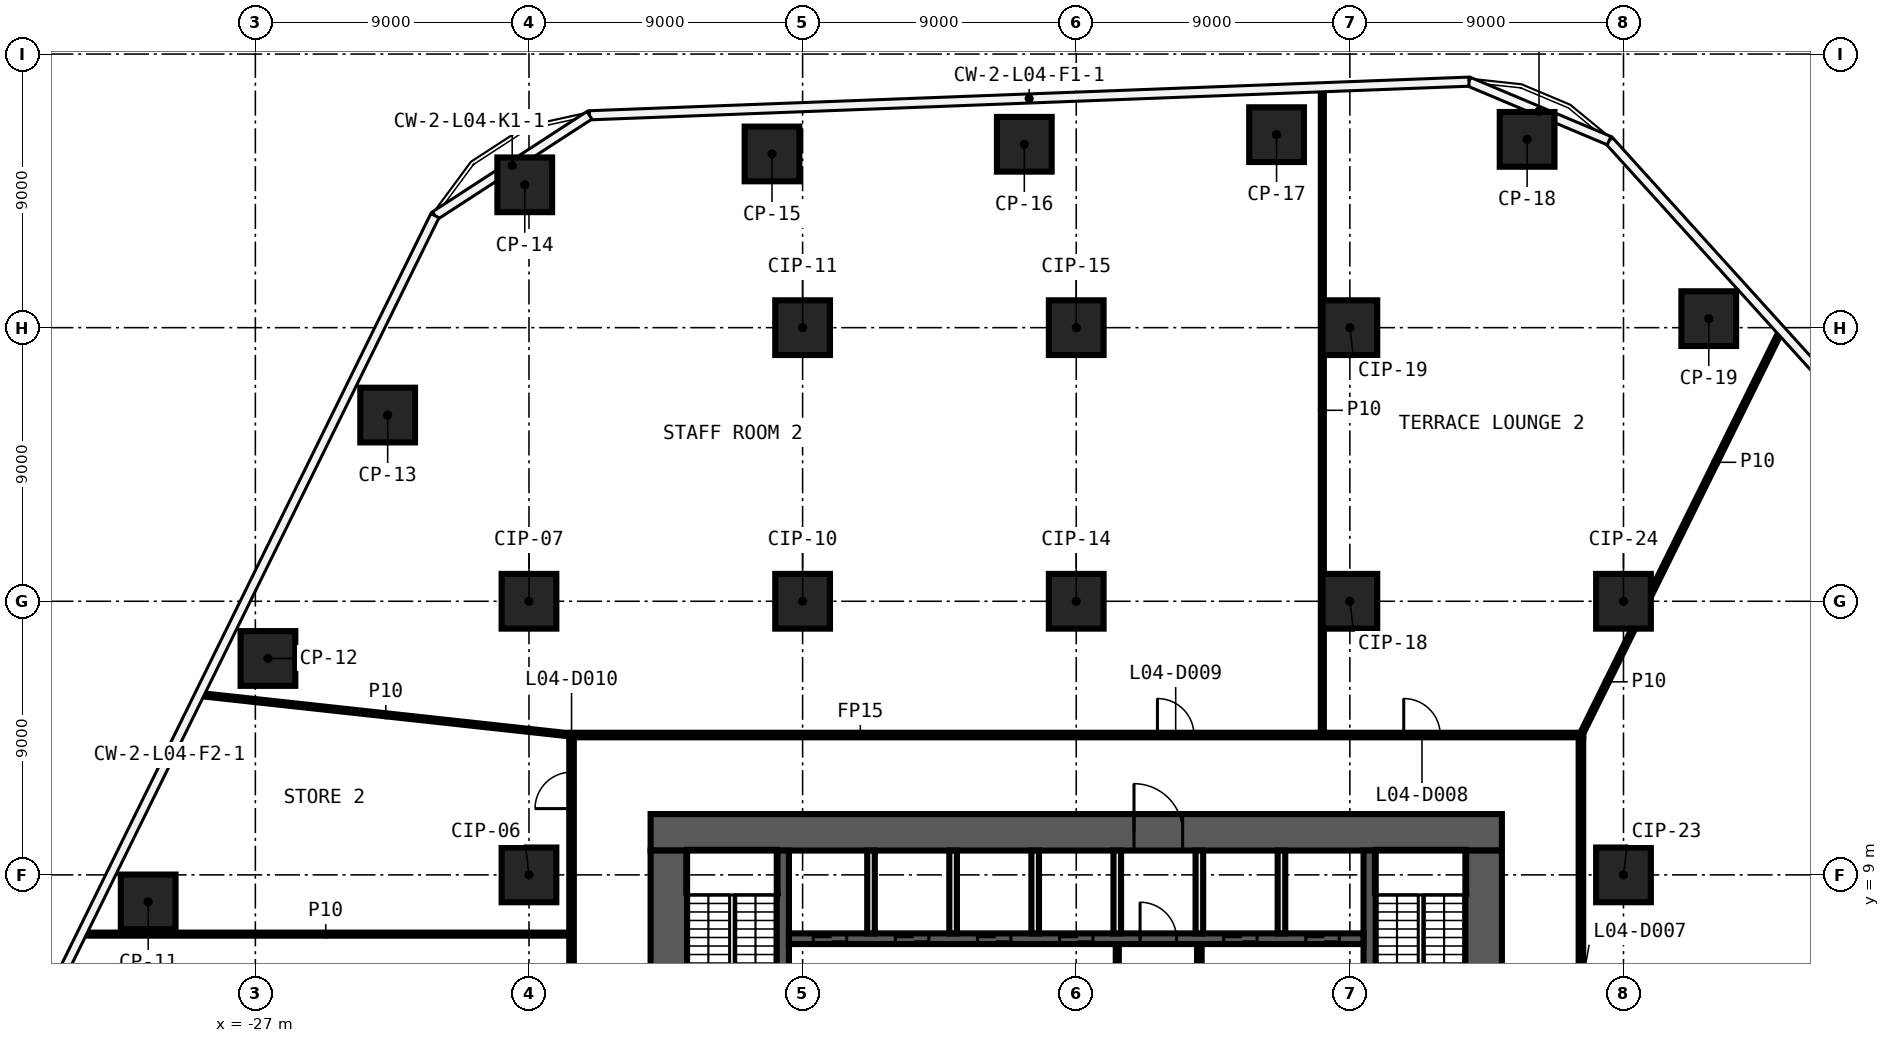
"""IFC4 building model, lengths in metres.
Left out: names, types, materials, properties, quantities, classifications, styles, units other than length and angle.
Written with IfcOpenShell. Run it as: python <this file> out.ifc"""

import sys

from ifc_helpers import new_model, si_unit, direction, frame, frame_2d, origin, origin_2d, place, context, subcontext, project, spatial, rectangle, extrude, element, fill, save


model = new_model("IFC4")
c1 = context("Model", 3, precision=1e-05, world=origin(), true_north=direction((0.0, 1.0)))
c2 = subcontext(c1, "Body", "Model", "MODEL_VIEW")
j1 = project(units=[si_unit("LENGTHUNIT", "METRE"), si_unit("PLANEANGLEUNIT", "RADIAN")], contexts=[c1])
p1 = place(None, origin())
s1 = spatial("IfcSite", under=j1, at=p1, CompositionType="ELEMENT")
p2 = place(p1, origin())
s2 = spatial("IfcBuilding", under=s1, at=p2, CompositionType="ELEMENT")
p3 = place(p2, frame((0.0, 0.0, 33.0)))
s3 = spatial("IfcBuildingStorey", under=s2, at=p3, CompositionType="ELEMENT", Elevation=33.0)
for number, where, z_axis, x_axis in (
    (1, (-30.525, 8.111, 0.0), (0.0, 0.0, 1.0), (1.0, 0.0, 0.0)),
    (2, (-26.586, 16.118, 0.0), (0.0, 0.0, 1.0), (1.0, 0.0, 0.0)),
    (3, (-22.648, 24.125, 0.0), (0.0, 0.0, 1.0), (1.0, 0.0, 0.0)),
    (4, (-18.139, 31.699, 0.0), (0.0, 0.0, 1.0), (1.0, 0.0, 0.0)),
    (5, (-10.006, 32.714, 0.0), (0.0, 0.0, 1.0), (1.0, 0.0, 0.0)),
    (6, (-1.708, 33.032, 0.0), (0.0, 0.0, 1.0), (1.0, 0.0, 0.0)),
    (7, (6.589, 33.349, 0.0), (0.0, 0.0, 1.0), (1.0, 0.0, 0.0)),
    (8, (14.83, 33.194, 0.0), (0.0, 0.0, 1.0), (1.0, 0.0, 0.0)),
    (9, (20.805, 27.297, 0.0), (0.0, 0.0, 1.0), (1.0, 0.0, 0.0)),
    (10, (-18.0, 9.0, 0.0), (0.0, 0.0, 1.0), (1.0, 0.0, 0.0)),
    (11, (-18.0, 18.0, 0.0), (0.0, 0.0, 1.0), (1.0, 0.0, 0.0)),
    (12, (-9.0, 18.0, 0.0), (0.0, 0.0, 1.0), (1.0, 0.0, 0.0)),
    (13, (-9.0, 27.0, 0.0), (0.0, 0.0, 1.0), (1.0, 0.0, 0.0)),
    (14, (0.0, 18.0, 0.0), (0.0, 0.0, 1.0), (1.0, 0.0, 0.0)),
    (15, (0.0, 27.0, 0.0), (0.0, 0.0, 1.0), (1.0, 0.0, 0.0)),
    (16, (9.0, 18.0, 0.0), (0.0, 0.0, 1.0), (1.0, 0.0, 0.0)),
    (17, (9.0, 27.0, 0.0), (0.0, 0.0, 1.0), (1.0, 0.0, 0.0)),
    (18, (18.0, 9.0, 0.0), (0.0, 0.0, 1.0), (1.0, 0.0, 0.0)),
    (19, (18.0, 18.0, 0.0), (0.0, 0.0, 1.0), (1.0, 0.0, 0.0)),
):
    element("IfcColumn", number, at=place(p3, frame(where, z_axis=z_axis, x_axis=x_axis)), inside=s3, PredefinedType="COLUMN", context=c2, shape_type="SweptSolid", body=[
        extrude(rectangle(XDim=1.8, YDim=1.8, at=origin_2d()), origin(), (0.0, 0.0, 1.0), 4.6),
    ])
p4 = place(p3, frame((-32.695, 7.051, 0.0), z_axis=(0.0, 0.0, 1.0), x_axis=(1.0, 0.0, 0.0)))
e20 = element("IfcWall", 20, at=p4, inside=s3, PredefinedType="PARTITIONING", context=c2, shape_type="SweptSolid", body=[
    extrude(rectangle(XDim=16.02, YDim=0.1, at=frame_2d((8.01, 0.0))), origin(), (0.0, 0.0, 1.0), 4.6),
])
p5 = place(p3, frame((-16.675, 13.6, 0.0), z_axis=(0.0, 0.0, 1.0), x_axis=(1.0, 0.0, 0.0)))
e21 = element("IfcWall", 21, at=p5, inside=s3, PredefinedType="PARTITIONING", context=c2, shape_type="SweptSolid", body=[
    extrude(rectangle(XDim=33.35, YDim=0.15, at=frame_2d((16.675, 0.0))), origin(), (0.0, 0.0, 1.0), 4.6),
])
p6 = place(p5, frame((27.447, 0.0, 0.0)))
e22 = element("IfcOpeningElement", 22, at=p6, cuts=e21, PredefinedType="OPENING", context=c2, shape_type="SweptSolid", body=[
    extrude(rectangle(XDim=1.2, YDim=2.1, at=frame_2d((0.6, 1.05))), frame((0.0, 0.085, 0.0), z_axis=(0.0, -1.0, 0.0), x_axis=(1.0, 0.0, 0.0)), (0.0, 0.0, 1.0), 0.17),
])
p7 = place(p5, frame((19.346, 0.0, 0.0)))
e23 = element("IfcOpeningElement", 23, at=p7, cuts=e21, PredefinedType="OPENING", context=c2, shape_type="SweptSolid", body=[
    extrude(rectangle(XDim=1.2, YDim=2.1, at=frame_2d((0.6, 1.05))), frame((0.0, 0.085, 0.0), z_axis=(0.0, -1.0, 0.0), x_axis=(1.0, 0.0, 0.0)), (0.0, 0.0, 1.0), 0.17),
])
p8 = place(p3, frame((16.6, 13.6, 0.0), z_axis=(0.0, 0.0, 1.0), x_axis=(0.443207247844, 0.896419173969, 0.0)))
e24 = element("IfcWall", 24, at=p8, inside=s3, PredefinedType="PARTITIONING", context=c2, shape_type="SweptSolid", body=[
    extrude(rectangle(XDim=3.905, YDim=0.1, at=frame_2d((1.952, 0.0))), origin(), (0.0, 0.0, 1.0), 4.6),
])
p9 = place(p3, frame((18.9, 18.253, 0.0), z_axis=(0.0, 0.0, 1.0), x_axis=(0.443225904803, 0.89640994936, 0.0)))
e25 = element("IfcWall", 25, at=p9, inside=s3, PredefinedType="PARTITIONING", context=c2, shape_type="SweptSolid", body=[
    extrude(rectangle(XDim=9.635, YDim=0.1, at=frame_2d((4.817, 0.0))), origin(), (0.0, 0.0, 1.0), 4.6),
])
p10 = place(p3, frame((16.6, 13.525, 0.0), z_axis=(0.0, 0.0, 1.0), x_axis=(0.0, -1.0, 0.0)))
e26 = element("IfcWall", 26, at=p10, inside=s3, PredefinedType="PARTITIONING", context=c2, shape_type="SweptSolid", body=[
    extrude(rectangle(XDim=27.05, YDim=0.15, at=frame_2d((13.525, 0.0))), origin(), (0.0, 0.0, 1.0), 4.6),
])
p11 = place(p10, frame((16.006, 0.0, 0.0)))
e27 = element("IfcOpeningElement", 27, at=p11, cuts=e26, PredefinedType="OPENING", context=c2, shape_type="SweptSolid", body=[
    extrude(rectangle(XDim=1.2, YDim=2.1, at=frame_2d((0.6, 1.05))), frame((0.0, 0.085, 0.0), z_axis=(0.0, -1.0, 0.0), x_axis=(1.0, 0.0, 0.0)), (0.0, 0.0, 1.0), 0.17),
])
p12 = place(p10, frame((7.745, 0.0, 0.0)))
e28 = element("IfcOpeningElement", 28, at=p12, cuts=e26, PredefinedType="OPENING", context=c2, shape_type="SweptSolid", body=[
    extrude(rectangle(XDim=1.2, YDim=2.1, at=frame_2d((0.6, 1.05))), frame((0.0, 0.085, 0.0), z_axis=(0.0, -1.0, 0.0), x_axis=(1.0, 0.0, 0.0)), (0.0, 0.0, 1.0), 0.17),
])
p13 = place(p3, frame((8.095, 13.675, 0.0), z_axis=(0.0, 0.0, 1.0), x_axis=(0.0, 1.0, 0.0)))
e29 = element("IfcWall", 29, at=p13, inside=s3, PredefinedType="PARTITIONING", context=c2, shape_type="SweptSolid", body=[
    extrude(rectangle(XDim=21.213, YDim=0.1, at=frame_2d((10.606, 0.0))), origin(), (0.0, 0.0, 1.0), 4.6),
])
p14 = place(p3, frame((-16.6, -13.525, 0.0), z_axis=(0.0, 0.0, 1.0), x_axis=(0.0, 1.0, 0.0)))
e30 = element("IfcWall", 30, at=p14, inside=s3, PredefinedType="PARTITIONING", context=c2, shape_type="SweptSolid", body=[
    extrude(rectangle(XDim=27.05, YDim=0.15, at=frame_2d((13.525, 0.0))), origin(), (0.0, 0.0, 1.0), 4.6),
])
p15 = place(p14, frame((16.028, 0.0, 0.0)))
e31 = element("IfcOpeningElement", 31, at=p15, cuts=e30, PredefinedType="OPENING", context=c2, shape_type="SweptSolid", body=[
    extrude(rectangle(XDim=1.2, YDim=2.1, at=frame_2d((0.6, 1.05))), frame((0.0, 0.085, 0.0), z_axis=(0.0, -1.0, 0.0), x_axis=(1.0, 0.0, 0.0)), (0.0, 0.0, 1.0), 0.17),
])
p16 = place(p14, frame((1.121, 0.0, 0.0)))
e32 = element("IfcOpeningElement", 32, at=p16, cuts=e30, PredefinedType="OPENING", context=c2, shape_type="SweptSolid", body=[
    extrude(rectangle(XDim=1.2, YDim=2.1, at=frame_2d((0.6, 1.05))), frame((0.0, 0.085, 0.0), z_axis=(0.0, -1.0, 0.0), x_axis=(1.0, 0.0, 0.0)), (0.0, 0.0, 1.0), 0.17),
])
p17 = place(p14, frame((24.705, 0.0, 0.0)))
e33 = element("IfcOpeningElement", 33, at=p17, cuts=e30, PredefinedType="OPENING", context=c2, shape_type="SweptSolid", body=[
    extrude(rectangle(XDim=1.2, YDim=2.1, at=frame_2d((0.6, 1.05))), frame((0.0, 0.085, 0.0), z_axis=(0.0, -1.0, 0.0), x_axis=(1.0, 0.0, 0.0)), (0.0, 0.0, 1.0), 0.17),
])
p18 = place(p3, frame((-28.819, 14.931, 0.0), z_axis=(0.0, 0.0, 1.0), x_axis=(0.994112645196, -0.108351505116, 0.0)))
e34 = element("IfcWall", 34, at=p18, inside=s3, PredefinedType="PARTITIONING", context=c2, shape_type="SweptSolid", body=[
    extrude(rectangle(XDim=12.291, YDim=0.1, at=frame_2d((6.146, 0.0))), origin(), (0.0, 0.0, 1.0), 4.6),
])
p19 = place(p3, frame((-14.0, 10.4, 0.0), z_axis=(0.0, 0.0, 1.0), x_axis=(1.0, 0.0, 0.0)))
e35 = element("IfcWall", 35, at=p19, inside=s3, PredefinedType="SHEAR", context=c2, shape_type="SweptSolid", body=[
    extrude(rectangle(XDim=28.0, YDim=1.2, at=frame_2d((14.0, 0.0))), origin(), (0.0, 0.0, 1.0), 4.6),
])
p20 = place(p19, frame((15.9, 0.0, 0.0)))
e36 = element("IfcOpeningElement", 36, at=p20, cuts=e35, PredefinedType="OPENING", context=c2, shape_type="SweptSolid", body=[
    extrude(rectangle(XDim=1.6, YDim=2.1, at=frame_2d((0.8, 1.05))), frame((0.0, 0.61, 0.0), z_axis=(0.0, -1.0, 0.0), x_axis=(1.0, 0.0, 0.0)), (0.0, 0.0, 1.0), 1.22),
])
for number, where, z_axis, x_axis in (
    (37, (13.4, 9.8, 0.0), (0.0, 0.0, 1.0), (0.0, -1.0, 0.0)),
    (38, (-13.4, -9.8, 0.0), (0.0, 0.0, 1.0), (0.0, 1.0, 0.0)),
):
    element("IfcWall", number, at=place(p3, frame(where, z_axis=z_axis, x_axis=x_axis)), inside=s3, PredefinedType="SHEAR", context=c2, shape_type="SweptSolid", body=[
        extrude(rectangle(XDim=19.6, YDim=1.2, at=frame_2d((9.8, 0.0))), origin(), (0.0, 0.0, 1.0), 4.6),
    ])
p21 = place(p3, frame((9.65, 9.8, 0.0), z_axis=(0.0, 0.0, 1.0), x_axis=(0.0, -1.0, 0.0)))
e39 = element("IfcWall", 39, at=p21, inside=s3, PredefinedType="SHEAR", context=c2, shape_type="SweptSolid", body=[
    extrude(rectangle(XDim=7.5, YDim=0.4, at=frame_2d((3.75, 0.0))), origin(), (0.0, 0.0, 1.0), 4.6),
])
p22 = place(p21, frame((5.1, 0.0, 0.0)))
e40 = element("IfcOpeningElement", 40, at=p22, cuts=e39, PredefinedType="OPENING", context=c2, shape_type="SweptSolid", body=[
    extrude(rectangle(XDim=1.2, YDim=2.1, at=frame_2d((0.6, 1.05))), frame((0.0, 0.21, 0.0), z_axis=(0.0, -1.0, 0.0), x_axis=(1.0, 0.0, 0.0)), (0.0, 0.0, 1.0), 0.42),
])
p23 = place(p3, frame((-9.65, 2.3, 0.0), z_axis=(0.0, 0.0, 1.0), x_axis=(0.0, 1.0, 0.0)))
e41 = element("IfcWall", 41, at=p23, inside=s3, PredefinedType="SHEAR", context=c2, shape_type="SweptSolid", body=[
    extrude(rectangle(XDim=7.5, YDim=0.4, at=frame_2d((3.75, 0.0))), origin(), (0.0, 0.0, 1.0), 4.6),
])
p24 = place(p23, frame((1.2, 0.0, 0.0)))
e42 = element("IfcOpeningElement", 42, at=p24, cuts=e41, PredefinedType="OPENING", context=c2, shape_type="SweptSolid", body=[
    extrude(rectangle(XDim=1.2, YDim=2.1, at=frame_2d((0.6, 1.05))), frame((0.0, 0.21, 0.0), z_axis=(0.0, -1.0, 0.0), x_axis=(1.0, 0.0, 0.0)), (0.0, 0.0, 1.0), 0.42),
])
p25 = place(p3, frame((-9.45, 6.9, 0.0), z_axis=(0.0, 0.0, 1.0), x_axis=(1.0, 0.0, 0.0)))
e43 = element("IfcWall", 43, at=p25, inside=s3, PredefinedType="SHEAR", context=c2, shape_type="SweptSolid", body=[
    extrude(rectangle(XDim=18.9, YDim=0.35, at=frame_2d((9.45, 0.0))), origin(), (0.0, 0.0, 1.0), 4.6),
])
p26 = place(p25, frame((0.8, 0.0, 0.0)))
e44 = element("IfcOpeningElement", 44, at=p26, cuts=e43, PredefinedType="OPENING", context=c2, shape_type="SweptSolid", body=[
    extrude(rectangle(XDim=1.1, YDim=2.1, at=frame_2d((0.55, 1.05))), frame((0.0, 0.185, 0.0), z_axis=(0.0, -1.0, 0.0), x_axis=(1.0, 0.0, 0.0)), (0.0, 0.0, 1.0), 0.37),
])
p27 = place(p25, frame((3.5, 0.0, 0.0)))
e45 = element("IfcOpeningElement", 45, at=p27, cuts=e43, PredefinedType="OPENING", context=c2, shape_type="SweptSolid", body=[
    extrude(rectangle(XDim=1.1, YDim=2.1, at=frame_2d((0.55, 1.05))), frame((0.0, 0.185, 0.0), z_axis=(0.0, -1.0, 0.0), x_axis=(1.0, 0.0, 0.0)), (0.0, 0.0, 1.0), 0.37),
])
p28 = place(p25, frame((6.2, 0.0, 0.0)))
e46 = element("IfcOpeningElement", 46, at=p28, cuts=e43, PredefinedType="OPENING", context=c2, shape_type="SweptSolid", body=[
    extrude(rectangle(XDim=1.1, YDim=2.1, at=frame_2d((0.55, 1.05))), frame((0.0, 0.185, 0.0), z_axis=(0.0, -1.0, 0.0), x_axis=(1.0, 0.0, 0.0)), (0.0, 0.0, 1.0), 0.37),
])
p29 = place(p25, frame((8.9, 0.0, 0.0)))
e47 = element("IfcOpeningElement", 47, at=p29, cuts=e43, PredefinedType="OPENING", context=c2, shape_type="SweptSolid", body=[
    extrude(rectangle(XDim=1.1, YDim=2.1, at=frame_2d((0.55, 1.05))), frame((0.0, 0.185, 0.0), z_axis=(0.0, -1.0, 0.0), x_axis=(1.0, 0.0, 0.0)), (0.0, 0.0, 1.0), 0.37),
])
p30 = place(p25, frame((11.55, 0.0, 0.0)))
e48 = element("IfcOpeningElement", 48, at=p30, cuts=e43, PredefinedType="OPENING", context=c2, shape_type="SweptSolid", body=[
    extrude(rectangle(XDim=1.2, YDim=2.1, at=frame_2d((0.6, 1.05))), frame((0.0, 0.185, 0.0), z_axis=(0.0, -1.0, 0.0), x_axis=(1.0, 0.0, 0.0)), (0.0, 0.0, 1.0), 0.37),
])
p31 = place(p25, frame((14.3, 0.0, 0.0)))
e49 = element("IfcOpeningElement", 49, at=p31, cuts=e43, PredefinedType="OPENING", context=c2, shape_type="SweptSolid", body=[
    extrude(rectangle(XDim=1.1, YDim=2.1, at=frame_2d((0.55, 1.05))), frame((0.0, 0.185, 0.0), z_axis=(0.0, -1.0, 0.0), x_axis=(1.0, 0.0, 0.0)), (0.0, 0.0, 1.0), 0.37),
])
p32 = place(p25, frame((17.0, 0.0, 0.0)))
e50 = element("IfcOpeningElement", 50, at=p32, cuts=e43, PredefinedType="OPENING", context=c2, shape_type="SweptSolid", body=[
    extrude(rectangle(XDim=1.1, YDim=2.1, at=frame_2d((0.55, 1.05))), frame((0.0, 0.185, 0.0), z_axis=(0.0, -1.0, 0.0), x_axis=(1.0, 0.0, 0.0)), (0.0, 0.0, 1.0), 0.37),
])
p33 = place(p3, frame((6.75, 7.075, 0.0), z_axis=(0.0, 0.0, 1.0), x_axis=(0.0, 1.0, 0.0)))
e51 = element("IfcWall", 51, at=p33, inside=s3, PredefinedType="SOLIDWALL", context=c2, shape_type="SweptSolid", body=[
    extrude(rectangle(XDim=2.725, YDim=0.25, at=frame_2d((1.363, 0.0))), origin(), (0.0, 0.0, 1.0), 4.6),
])
p34 = place(p3, frame((4.05, 6.725, 0.0), z_axis=(0.0, 0.0, 1.0), x_axis=(0.0, -1.0, 0.0)))
e52 = element("IfcWall", 52, at=p34, inside=s3, PredefinedType="PARTITIONING", context=c2, shape_type="SweptSolid", body=[
    extrude(rectangle(XDim=3.25, YDim=0.15, at=frame_2d((1.625, 0.0))), origin(), (0.0, 0.0, 1.0), 4.6),
])
p35 = place(p34, frame((1.025, 0.0, 0.0)))
e53 = element("IfcOpeningElement", 53, at=p35, cuts=e52, PredefinedType="OPENING", context=c2, shape_type="SweptSolid", body=[
    extrude(rectangle(XDim=1.2, YDim=2.1, at=frame_2d((0.6, 1.05))), frame((0.0, 0.085, 0.0), z_axis=(0.0, -1.0, 0.0), x_axis=(1.0, 0.0, 0.0)), (0.0, 0.0, 1.0), 0.17),
])
p36 = place(p3, frame((4.05, 7.075, 0.0), z_axis=(0.0, 0.0, 1.0), x_axis=(0.0, 1.0, 0.0)))
e54 = element("IfcWall", 54, at=p36, inside=s3, PredefinedType="SOLIDWALL", context=c2, shape_type="SweptSolid", body=[
    extrude(rectangle(XDim=2.725, YDim=0.25, at=frame_2d((1.363, 0.0))), origin(), (0.0, 0.0, 1.0), 4.6),
])
p37 = place(p3, frame((1.35, 6.725, 0.0), z_axis=(0.0, 0.0, 1.0), x_axis=(0.0, -1.0, 0.0)))
e55 = element("IfcWall", 55, at=p37, inside=s3, PredefinedType="PARTITIONING", context=c2, shape_type="SweptSolid", body=[
    extrude(rectangle(XDim=3.25, YDim=0.1, at=frame_2d((1.625, 0.0))), origin(), (0.0, 0.0, 1.0), 4.6),
])
p38 = place(p37, frame((1.025, 0.0, 0.0)))
e56 = element("IfcOpeningElement", 56, at=p38, cuts=e55, PredefinedType="OPENING", context=c2, shape_type="SweptSolid", body=[
    extrude(rectangle(XDim=1.2, YDim=2.1, at=frame_2d((0.6, 1.05))), frame((0.0, 0.06, 0.0), z_axis=(0.0, -1.0, 0.0), x_axis=(1.0, 0.0, 0.0)), (0.0, 0.0, 1.0), 0.12),
])
for number, where, z_axis, x_axis in (
    (57, (1.35, 7.075, 0.0), (0.0, 0.0, 1.0), (0.0, 1.0, 0.0)),
    (58, (-1.35, 7.075, 0.0), (0.0, 0.0, 1.0), (0.0, 1.0, 0.0)),
    (59, (-4.05, 7.075, 0.0), (0.0, 0.0, 1.0), (0.0, 1.0, 0.0)),
    (60, (-6.75, 7.075, 0.0), (0.0, 0.0, 1.0), (0.0, 1.0, 0.0)),
):
    element("IfcWall", number, at=place(p3, frame(where, z_axis=z_axis, x_axis=x_axis)), inside=s3, PredefinedType="SOLIDWALL", context=c2, shape_type="SweptSolid", body=[
        extrude(rectangle(XDim=2.725, YDim=0.25, at=frame_2d((1.363, 0.0))), origin(), (0.0, 0.0, 1.0), 4.6),
    ])
p39 = place(p6, origin())
e61 = element("IfcDoor", 61, at=p39, inside=s3, OperationType="SINGLE_SWING_LEFT", PredefinedType="DOOR", context=c2, shape_type="SweptSolid", body=[
    extrude(rectangle(XDim=1.2, YDim=2.1, at=frame_2d((0.6, 1.05))), frame((0.0, 0.025, 0.0), z_axis=(0.0, -1.0, 0.0), x_axis=(1.0, 0.0, 0.0)), (0.0, 0.0, 1.0), 0.05),
])
fill(e22, e61)
p40 = place(p7, origin())
e62 = element("IfcDoor", 62, at=p40, inside=s3, OperationType="SINGLE_SWING_RIGHT", PredefinedType="DOOR", context=c2, shape_type="SweptSolid", body=[
    extrude(rectangle(XDim=1.2, YDim=2.1, at=frame_2d((0.6, 1.05))), frame((0.0, 0.025, 0.0), z_axis=(0.0, -1.0, 0.0), x_axis=(1.0, 0.0, 0.0)), (0.0, 0.0, 1.0), 0.05),
])
fill(e23, e62)
p41 = place(p17, origin())
e63 = element("IfcDoor", 63, at=p41, inside=s3, OperationType="SINGLE_SWING_LEFT", PredefinedType="DOOR", context=c2, shape_type="SweptSolid", body=[
    extrude(rectangle(XDim=1.2, YDim=2.1, at=frame_2d((0.6, 1.05))), frame((0.0, 0.025, 0.0), z_axis=(0.0, -1.0, 0.0), x_axis=(1.0, 0.0, 0.0)), (0.0, 0.0, 1.0), 0.05),
])
fill(e33, e63)
p42 = place(p26, origin())
e64 = element("IfcDoor", 64, at=p42, inside=s3, OperationType="DOUBLE_DOOR_SLIDING", PredefinedType="DOOR", context=c2, shape_type="SweptSolid", body=[
    extrude(rectangle(XDim=1.1, YDim=2.1, at=frame_2d((0.55, 1.05))), frame((0.0, 0.025, 0.0), z_axis=(0.0, -1.0, 0.0), x_axis=(1.0, 0.0, 0.0)), (0.0, 0.0, 1.0), 0.05),
])
fill(e44, e64)
p43 = place(p27, origin())
e65 = element("IfcDoor", 65, at=p43, inside=s3, OperationType="DOUBLE_DOOR_SLIDING", PredefinedType="DOOR", context=c2, shape_type="SweptSolid", body=[
    extrude(rectangle(XDim=1.1, YDim=2.1, at=frame_2d((0.55, 1.05))), frame((0.0, 0.025, 0.0), z_axis=(0.0, -1.0, 0.0), x_axis=(1.0, 0.0, 0.0)), (0.0, 0.0, 1.0), 0.05),
])
fill(e45, e65)
p44 = place(p28, origin())
e66 = element("IfcDoor", 66, at=p44, inside=s3, OperationType="DOUBLE_DOOR_SLIDING", PredefinedType="DOOR", context=c2, shape_type="SweptSolid", body=[
    extrude(rectangle(XDim=1.1, YDim=2.1, at=frame_2d((0.55, 1.05))), frame((0.0, 0.025, 0.0), z_axis=(0.0, -1.0, 0.0), x_axis=(1.0, 0.0, 0.0)), (0.0, 0.0, 1.0), 0.05),
])
fill(e46, e66)
p45 = place(p29, origin())
e67 = element("IfcDoor", 67, at=p45, inside=s3, OperationType="DOUBLE_DOOR_SLIDING", PredefinedType="DOOR", context=c2, shape_type="SweptSolid", body=[
    extrude(rectangle(XDim=1.1, YDim=2.1, at=frame_2d((0.55, 1.05))), frame((0.0, 0.025, 0.0), z_axis=(0.0, -1.0, 0.0), x_axis=(1.0, 0.0, 0.0)), (0.0, 0.0, 1.0), 0.05),
])
fill(e47, e67)
p46 = place(p20, origin())
e68 = element("IfcDoor", 68, at=p46, inside=s3, OperationType="DOUBLE_DOOR_SINGLE_SWING", PredefinedType="DOOR", context=c2, shape_type="SweptSolid", body=[
    extrude(rectangle(XDim=1.6, YDim=2.1, at=frame_2d((0.8, 1.05))), frame((0.0, 0.025, 0.0), z_axis=(0.0, -1.0, 0.0), x_axis=(1.0, 0.0, 0.0)), (0.0, 0.0, 1.0), 0.05),
])
fill(e36, e68)
p47 = place(p30, origin())
e69 = element("IfcDoor", 69, at=p47, inside=s3, OperationType="SINGLE_SWING_LEFT", PredefinedType="DOOR", context=c2, shape_type="SweptSolid", body=[
    extrude(rectangle(XDim=1.2, YDim=2.1, at=frame_2d((0.6, 1.05))), frame((0.0, 0.025, 0.0), z_axis=(0.0, -1.0, 0.0), x_axis=(1.0, 0.0, 0.0)), (0.0, 0.0, 1.0), 0.05),
])
fill(e48, e69)
p48 = place(p31, origin())
e70 = element("IfcDoor", 70, at=p48, inside=s3, OperationType="DOUBLE_DOOR_SLIDING", PredefinedType="DOOR", context=c2, shape_type="SweptSolid", body=[
    extrude(rectangle(XDim=1.1, YDim=2.1, at=frame_2d((0.55, 1.05))), frame((0.0, 0.025, 0.0), z_axis=(0.0, -1.0, 0.0), x_axis=(1.0, 0.0, 0.0)), (0.0, 0.0, 1.0), 0.05),
])
fill(e49, e70)
p49 = place(p32, origin())
e71 = element("IfcDoor", 71, at=p49, inside=s3, OperationType="DOUBLE_DOOR_SLIDING", PredefinedType="DOOR", context=c2, shape_type="SweptSolid", body=[
    extrude(rectangle(XDim=1.1, YDim=2.1, at=frame_2d((0.55, 1.05))), frame((0.0, 0.025, 0.0), z_axis=(0.0, -1.0, 0.0), x_axis=(1.0, 0.0, 0.0)), (0.0, 0.0, 1.0), 0.05),
])
fill(e50, e71)
save(model, sys.argv[1])
